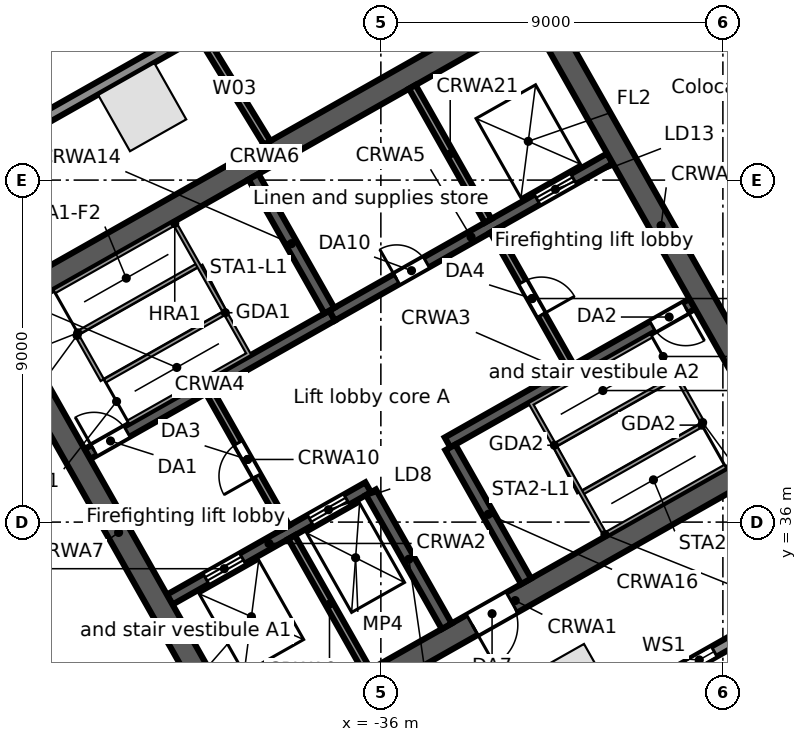
"""IFC4 building model, lengths in metres.
Left out: names, types, materials, properties, quantities, classifications, styles, units other than length and angle.
Written with IfcOpenShell. Run it as: python <this file> out.ifc"""

import sys

from ifc_helpers import new_model, si_unit, direction, frame, frame_2d, origin, origin_2d, place, context, subcontext, project, spatial, rectangle, extrude, element, fill, save


model = new_model("IFC4")
c1 = context("Model", 3, precision=1e-05, world=origin(), true_north=direction((0.0, 1.0)))
c2 = subcontext(c1, "Body", "Model", "MODEL_VIEW")
j1 = project(units=[si_unit("LENGTHUNIT", "METRE"), si_unit("PLANEANGLEUNIT", "RADIAN")], contexts=[c1])
p1 = place(None, origin())
s1 = spatial("IfcSite", under=j1, at=p1, CompositionType="ELEMENT")
p2 = place(p1, origin())
s2 = spatial("IfcBuilding", under=s1, at=p2, CompositionType="ELEMENT")
p3 = place(p2, frame((0.0, 0.0, 26.5)))
s3 = spatial("IfcBuildingStorey", under=s2, at=p3, CompositionType="ELEMENT", Elevation=26.5)
for number, where, z_axis, x_axis in (
    (1, (-42.28, 46.919, 0.0), (0.0, 0.0, 1.0), (-0.87, -0.492, 0.0)),
    (2, (-30.976, 31.635, 0.0), (0.0, 0.0, 1.0), (0.87, 0.492, 0.0)),
):
    element("IfcColumn", number, at=place(p3, frame(where, z_axis=z_axis, x_axis=x_axis)), inside=s3, PredefinedType="COLUMN", context=c2, shape_type="SweptSolid", body=[
        extrude(rectangle(XDim=1.7, YDim=1.7, at=origin_2d()), origin(), (0.0, 0.0, 1.0), 5.0),
    ])
p4 = place(p3, frame((-58.745, 38.764, 0.0), z_axis=(0.0, 0.0, 1.0), x_axis=(0.870355811726, 0.492423355453, 0.0)))
e3 = element("IfcWall", 3, at=p4, inside=s3, PredefinedType="STANDARD", context=c2, shape_type="SweptSolid", body=[
    extrude(rectangle(XDim=64.025, YDim=0.3, at=frame_2d((32.013, 0.0))), origin(), (0.0, 0.0, 1.0), 4.68),
])
p5 = place(p4, frame((60.122, 0.0, 0.6)))
e4 = element("IfcOpeningElement", 4, at=p5, cuts=e3, PredefinedType="OPENING", context=c2, shape_type="SweptSolid", body=[
    extrude(rectangle(XDim=0.9, YDim=3.2, at=frame_2d((0.45, 1.6))), frame((0.0, 0.16, 0.0), z_axis=(0.0, -1.0, 0.0), x_axis=(1.0, 0.0, 0.0)), (0.0, 0.0, 1.0), 0.32),
])
p6 = place(p4, frame((50.992, 0.0, 0.6)))
e5 = element("IfcOpeningElement", 5, at=p6, cuts=e3, PredefinedType="OPENING", context=c2, shape_type="SweptSolid", body=[
    extrude(rectangle(XDim=0.9, YDim=3.2, at=frame_2d((0.45, 1.6))), frame((0.0, 0.16, 0.0), z_axis=(0.0, -1.0, 0.0), x_axis=(1.0, 0.0, 0.0)), (0.0, 0.0, 1.0), 0.32),
])
p7 = place(p4, frame((41.862, 0.0, 0.6)))
e6 = element("IfcOpeningElement", 6, at=p7, cuts=e3, PredefinedType="OPENING", context=c2, shape_type="SweptSolid", body=[
    extrude(rectangle(XDim=0.9, YDim=3.2, at=frame_2d((0.45, 1.6))), frame((0.0, 0.16, 0.0), z_axis=(0.0, -1.0, 0.0), x_axis=(1.0, 0.0, 0.0)), (0.0, 0.0, 1.0), 0.32),
])
p8 = place(p4, frame((39.129, 0.0, 0.0)))
e7 = element("IfcOpeningElement", 7, at=p8, cuts=e3, PredefinedType="OPENING", context=c2, shape_type="SweptSolid", body=[
    extrude(rectangle(XDim=1.8, YDim=2.4, at=frame_2d((0.9, 1.2))), frame((0.0, 0.16, 0.0), z_axis=(0.0, -1.0, 0.0), x_axis=(1.0, 0.0, 0.0)), (0.0, 0.0, 1.0), 0.32),
])
p9 = place(p4, frame((32.732, 0.0, 0.6)))
e8 = element("IfcOpeningElement", 8, at=p9, cuts=e3, PredefinedType="OPENING", context=c2, shape_type="SweptSolid", body=[
    extrude(rectangle(XDim=0.9, YDim=3.2, at=frame_2d((0.45, 1.6))), frame((0.0, 0.16, 0.0), z_axis=(0.0, -1.0, 0.0), x_axis=(1.0, 0.0, 0.0)), (0.0, 0.0, 1.0), 0.32),
])
p10 = place(p4, frame((23.602, 0.0, 0.6)))
e9 = element("IfcOpeningElement", 9, at=p10, cuts=e3, PredefinedType="OPENING", context=c2, shape_type="SweptSolid", body=[
    extrude(rectangle(XDim=0.9, YDim=3.2, at=frame_2d((0.45, 1.6))), frame((0.0, 0.16, 0.0), z_axis=(0.0, -1.0, 0.0), x_axis=(1.0, 0.0, 0.0)), (0.0, 0.0, 1.0), 0.32),
])
p11 = place(p4, frame((20.87, 0.0, 0.0)))
e10 = element("IfcOpeningElement", 10, at=p11, cuts=e3, PredefinedType="OPENING", context=c2, shape_type="SweptSolid", body=[
    extrude(rectangle(XDim=1.8, YDim=2.4, at=frame_2d((0.9, 1.2))), frame((0.0, 0.16, 0.0), z_axis=(0.0, -1.0, 0.0), x_axis=(1.0, 0.0, 0.0)), (0.0, 0.0, 1.0), 0.32),
])
p12 = place(p4, frame((14.472, 0.0, 0.6)))
e11 = element("IfcOpeningElement", 11, at=p12, cuts=e3, PredefinedType="OPENING", context=c2, shape_type="SweptSolid", body=[
    extrude(rectangle(XDim=0.9, YDim=3.2, at=frame_2d((0.45, 1.6))), frame((0.0, 0.16, 0.0), z_axis=(0.0, -1.0, 0.0), x_axis=(1.0, 0.0, 0.0)), (0.0, 0.0, 1.0), 0.32),
])
p13 = place(p4, frame((5.342, 0.0, 0.6)))
e12 = element("IfcOpeningElement", 12, at=p13, cuts=e3, PredefinedType="OPENING", context=c2, shape_type="SweptSolid", body=[
    extrude(rectangle(XDim=0.9, YDim=3.2, at=frame_2d((0.45, 1.6))), frame((0.0, 0.16, 0.0), z_axis=(0.0, -1.0, 0.0), x_axis=(1.0, 0.0, 0.0)), (0.0, 0.0, 1.0), 0.32),
])
p14 = place(p3, frame((-44.109, 26.504, 0.0), z_axis=(0.0, 0.0, 1.0), x_axis=(-0.857169502585, 0.515034410344, 0.0)))
e13 = element("IfcWall", 13, at=p14, inside=s3, PredefinedType="STANDARD", context=c2, shape_type="SweptSolid", body=[
    extrude(rectangle(XDim=17.127, YDim=0.3, at=frame_2d((8.563, 0.0))), origin(), (0.0, 0.0, 1.0), 4.68),
])
p15 = place(p14, frame((13.403, 0.0, 0.6)))
e14 = element("IfcOpeningElement", 14, at=p15, cuts=e13, PredefinedType="OPENING", context=c2, shape_type="SweptSolid", body=[
    extrude(rectangle(XDim=0.9, YDim=3.2, at=frame_2d((0.45, 1.6))), frame((0.0, 0.16, 0.0), z_axis=(0.0, -1.0, 0.0), x_axis=(1.0, 0.0, 0.0)), (0.0, 0.0, 1.0), 0.32),
])
p16 = place(p14, frame((10.828, 0.0, 0.0)))
e15 = element("IfcOpeningElement", 15, at=p16, cuts=e13, PredefinedType="OPENING", context=c2, shape_type="SweptSolid", body=[
    extrude(rectangle(XDim=1.8, YDim=2.4, at=frame_2d((0.9, 1.2))), frame((0.0, 0.16, 0.0), z_axis=(0.0, -1.0, 0.0), x_axis=(1.0, 0.0, 0.0)), (0.0, 0.0, 1.0), 0.32),
])
p17 = place(p14, frame((4.903, 0.0, 0.6)))
e16 = element("IfcOpeningElement", 16, at=p17, cuts=e13, PredefinedType="OPENING", context=c2, shape_type="SweptSolid", body=[
    extrude(rectangle(XDim=0.9, YDim=3.2, at=frame_2d((0.45, 1.6))), frame((0.0, 0.16, 0.0), z_axis=(0.0, -1.0, 0.0), x_axis=(1.0, 0.0, 0.0)), (0.0, 0.0, 1.0), 0.32),
])
p18 = place(p14, frame((2.328, 0.0, 0.0)))
e17 = element("IfcOpeningElement", 17, at=p18, cuts=e13, PredefinedType="OPENING", context=c2, shape_type="SweptSolid", body=[
    extrude(rectangle(XDim=1.8, YDim=2.4, at=frame_2d((0.9, 1.2))), frame((0.0, 0.16, 0.0), z_axis=(0.0, -1.0, 0.0), x_axis=(1.0, 0.0, 0.0)), (0.0, 0.0, 1.0), 0.32),
])
p19 = place(p3, frame((-0.055, 47.969, 0.0), z_axis=(0.0, 0.0, 1.0), x_axis=(-0.870355730478, -0.492423499058, 0.0)))
e18 = element("IfcWall", 18, at=p19, inside=s3, PredefinedType="STANDARD", context=c2, shape_type="SweptSolid", body=[
    extrude(rectangle(XDim=43.75, YDim=0.3, at=frame_2d((21.875, 0.0))), origin(), (0.0, 0.0, 1.0), 4.68),
])
p20 = place(p19, frame((39.977, 0.0, 0.6)))
e19 = element("IfcOpeningElement", 19, at=p20, cuts=e18, PredefinedType="OPENING", context=c2, shape_type="SweptSolid", body=[
    extrude(rectangle(XDim=0.9, YDim=3.2, at=frame_2d((0.45, 1.6))), frame((0.0, 0.16, 0.0), z_axis=(0.0, -1.0, 0.0), x_axis=(1.0, 0.0, 0.0)), (0.0, 0.0, 1.0), 0.32),
])
p21 = place(p19, frame((31.222, 0.0, 0.6)))
e20 = element("IfcOpeningElement", 20, at=p21, cuts=e18, PredefinedType="OPENING", context=c2, shape_type="SweptSolid", body=[
    extrude(rectangle(XDim=0.9, YDim=3.2, at=frame_2d((0.45, 1.6))), frame((0.0, 0.16, 0.0), z_axis=(0.0, -1.0, 0.0), x_axis=(1.0, 0.0, 0.0)), (0.0, 0.0, 1.0), 0.32),
])
p22 = place(p19, frame((28.584, 0.0, 0.0)))
e21 = element("IfcOpeningElement", 21, at=p22, cuts=e18, PredefinedType="OPENING", context=c2, shape_type="SweptSolid", body=[
    extrude(rectangle(XDim=1.8, YDim=2.4, at=frame_2d((0.9, 1.2))), frame((0.0, 0.16, 0.0), z_axis=(0.0, -1.0, 0.0), x_axis=(1.0, 0.0, 0.0)), (0.0, 0.0, 1.0), 0.32),
])
p23 = place(p19, frame((22.468, 0.0, 0.6)))
e22 = element("IfcOpeningElement", 22, at=p23, cuts=e18, PredefinedType="OPENING", context=c2, shape_type="SweptSolid", body=[
    extrude(rectangle(XDim=0.9, YDim=3.2, at=frame_2d((0.45, 1.6))), frame((0.0, 0.16, 0.0), z_axis=(0.0, -1.0, 0.0), x_axis=(1.0, 0.0, 0.0)), (0.0, 0.0, 1.0), 0.32),
])
p24 = place(p19, frame((13.713, 0.0, 0.6)))
e23 = element("IfcOpeningElement", 23, at=p24, cuts=e18, PredefinedType="OPENING", context=c2, shape_type="SweptSolid", body=[
    extrude(rectangle(XDim=0.9, YDim=3.2, at=frame_2d((0.45, 1.6))), frame((0.0, 0.16, 0.0), z_axis=(0.0, -1.0, 0.0), x_axis=(1.0, 0.0, 0.0)), (0.0, 0.0, 1.0), 0.32),
])
p25 = place(p19, frame((11.075, 0.0, 0.0)))
e24 = element("IfcOpeningElement", 24, at=p25, cuts=e18, PredefinedType="OPENING", context=c2, shape_type="SweptSolid", body=[
    extrude(rectangle(XDim=1.8, YDim=2.4, at=frame_2d((0.9, 1.2))), frame((0.0, 0.16, 0.0), z_axis=(0.0, -1.0, 0.0), x_axis=(1.0, 0.0, 0.0)), (0.0, 0.0, 1.0), 0.32),
])
p26 = place(p19, frame((4.959, 0.0, 0.6)))
e25 = element("IfcOpeningElement", 25, at=p26, cuts=e18, PredefinedType="OPENING", context=c2, shape_type="SweptSolid", body=[
    extrude(rectangle(XDim=0.9, YDim=3.2, at=frame_2d((0.45, 1.6))), frame((0.0, 0.16, 0.0), z_axis=(0.0, -1.0, 0.0), x_axis=(1.0, 0.0, 0.0)), (0.0, 0.0, 1.0), 0.32),
])
p27 = place(p3, frame((-39.862, 29.749, 0.0), z_axis=(0.0, 0.0, 1.0), x_axis=(0.870350116061, 0.492433422375, 0.0)))
e26 = element("IfcWall", 26, at=p27, inside=s3, PredefinedType="SOLIDWALL", context=c2, shape_type="SweptSolid", body=[
    extrude(rectangle(XDim=17.0, YDim=0.6, at=frame_2d((8.5, 0.0))), origin(), (0.0, 0.0, 1.0), 4.68),
])
p28 = place(p27, frame((7.2, 0.0, 0.0)))
e27 = element("IfcOpeningElement", 27, at=p28, cuts=e26, PredefinedType="OPENING", context=c2, shape_type="SweptSolid", body=[
    extrude(rectangle(XDim=1.2, YDim=2.1, at=frame_2d((0.6, 1.05))), frame((0.0, 0.31, 0.0), z_axis=(0.0, -1.0, 0.0), x_axis=(1.0, 0.0, 0.0)), (0.0, 0.0, 1.0), 0.62),
])
p29 = place(p3, frame((-41.556, 33.961, 0.0), z_axis=(0.0, 0.0, 1.0), x_axis=(0.870343731308, 0.492444706919, 0.0)))
e28 = element("IfcWall", 28, at=p29, inside=s3, PredefinedType="SOLIDWALL", context=c2, shape_type="SweptSolid", body=[
    extrude(rectangle(XDim=6.0, YDim=0.3, at=frame_2d((3.0, 0.0))), origin(), (0.0, 0.0, 1.0), 4.68),
])
p30 = place(p29, frame((1.1, 0.0, 0.0)))
e29 = element("IfcOpeningElement", 29, at=p30, cuts=e28, PredefinedType="OPENING", context=c2, shape_type="SweptSolid", body=[
    extrude(rectangle(XDim=1.1, YDim=2.1, at=frame_2d((0.55, 1.05))), frame((0.0, 0.16, 0.0), z_axis=(0.0, -1.0, 0.0), x_axis=(1.0, 0.0, 0.0)), (0.0, 0.0, 1.0), 0.32),
])
p31 = place(p29, frame((4.25, 0.0, 0.0)))
e30 = element("IfcOpeningElement", 30, at=p31, cuts=e28, PredefinedType="OPENING", context=c2, shape_type="SweptSolid", body=[
    extrude(rectangle(XDim=1.1, YDim=2.1, at=frame_2d((0.55, 1.05))), frame((0.0, 0.16, 0.0), z_axis=(0.0, -1.0, 0.0), x_axis=(1.0, 0.0, 0.0)), (0.0, 0.0, 1.0), 0.32),
])
p32 = place(p3, frame((-34.245, 38.097, 0.0), z_axis=(0.0, 0.0, 1.0), x_axis=(0.870364910201, 0.492407273597, 0.0)))
e31 = element("IfcWall", 31, at=p32, inside=s3, PredefinedType="SOLIDWALL", context=c2, shape_type="SweptSolid", body=[
    extrude(rectangle(XDim=7.4, YDim=0.3, at=frame_2d((3.7, 0.0))), origin(), (0.0, 0.0, 1.0), 4.68),
])
p33 = place(p32, frame((6.2, 0.0, 0.0)))
e32 = element("IfcOpeningElement", 32, at=p33, cuts=e31, PredefinedType="OPENING", context=c2, shape_type="SweptSolid", body=[
    extrude(rectangle(XDim=1.0, YDim=2.1, at=frame_2d((0.5, 1.05))), frame((0.0, 0.16, 0.0), z_axis=(0.0, -1.0, 0.0), x_axis=(1.0, 0.0, 0.0)), (0.0, 0.0, 1.0), 0.32),
])
p34 = place(p3, frame((-43.723, 37.791, 0.0), z_axis=(0.0, 0.0, 1.0), x_axis=(0.87035077051, 0.49243226567, 0.0)))
e33 = element("IfcWall", 33, at=p34, inside=s3, PredefinedType="SOLIDWALL", context=c2, shape_type="SweptSolid", body=[
    extrude(rectangle(XDim=7.4, YDim=0.3, at=frame_2d((3.7, 0.0))), origin(), (0.0, 0.0, 1.0), 4.68),
])
p35 = place(p34, frame((0.2, 0.0, 0.0)))
e34 = element("IfcOpeningElement", 34, at=p35, cuts=e33, PredefinedType="OPENING", context=c2, shape_type="SweptSolid", body=[
    extrude(rectangle(XDim=1.0, YDim=2.1, at=frame_2d((0.5, 1.05))), frame((0.0, 0.16, 0.0), z_axis=(0.0, -1.0, 0.0), x_axis=(1.0, 0.0, 0.0)), (0.0, 0.0, 1.0), 0.32),
])
p36 = place(p3, frame((-37.282, 41.435, 0.0), z_axis=(0.0, 0.0, 1.0), x_axis=(0.870356516133, 0.492422110414, 0.0)))
e35 = element("IfcWall", 35, at=p36, inside=s3, PredefinedType="SOLIDWALL", context=c2, shape_type="SweptSolid", body=[
    extrude(rectangle(XDim=8.4, YDim=0.3, at=frame_2d((4.2, 0.0))), origin(), (0.0, 0.0, 1.0), 4.68),
])
p37 = place(p36, frame((6.2, 0.0, 0.0)))
e36 = element("IfcOpeningElement", 36, at=p37, cuts=e35, PredefinedType="OPENING", context=c2, shape_type="SweptSolid", body=[
    extrude(rectangle(XDim=1.1, YDim=2.1, at=frame_2d((0.55, 1.05))), frame((0.0, 0.16, 0.0), z_axis=(0.0, -1.0, 0.0), x_axis=(1.0, 0.0, 0.0)), (0.0, 0.0, 1.0), 0.32),
])
p38 = place(p36, frame((1.95, 0.0, 0.0)))
e37 = element("IfcOpeningElement", 37, at=p38, cuts=e35, PredefinedType="OPENING", context=c2, shape_type="SweptSolid", body=[
    extrude(rectangle(XDim=0.9, YDim=2.1, at=frame_2d((0.45, 1.05))), frame((0.0, 0.16, 0.0), z_axis=(0.0, -1.0, 0.0), x_axis=(1.0, 0.0, 0.0)), (0.0, 0.0, 1.0), 0.32),
])
p39 = place(p3, frame((-46.461, 41.412, 0.0), z_axis=(0.0, 0.0, 1.0), x_axis=(0.870350116061, 0.492433422375, 0.0)))
e38 = element("IfcWall", 38, at=p39, inside=s3, PredefinedType="SOLIDWALL", context=c2, shape_type="SweptSolid", body=[
    extrude(rectangle(XDim=17.0, YDim=0.6, at=frame_2d((8.5, 0.0))), origin(), (0.0, 0.0, 1.0), 4.68),
])
p40 = place(p3, frame((-46.052, 41.298, 0.0), z_axis=(0.0, 0.0, 1.0), x_axis=(0.492418598281, -0.870358503186, 0.0)))
e39 = element("IfcWall", 39, at=p40, inside=s3, PredefinedType="SOLIDWALL", context=c2, shape_type="SweptSolid", body=[
    extrude(rectangle(XDim=12.8, YDim=0.6, at=frame_2d((6.4, 0.0))), origin(), (0.0, 0.0, 1.0), 4.68),
])
p41 = place(p3, frame((-38.349, 35.603, 0.0), z_axis=(0.0, 0.0, 1.0), x_axis=(0.49241474071, -0.870360685654, 0.0)))
e40 = element("IfcWall", 40, at=p41, inside=s3, PredefinedType="SOLIDWALL", context=c2, shape_type="SweptSolid", body=[
    extrude(rectangle(XDim=4.05, YDim=0.2, at=frame_2d((2.025, 0.0))), origin(), (0.0, 0.0, 1.0), 4.68),
])
p42 = place(p3, frame((-40.516, 39.433, 0.0), z_axis=(0.0, 0.0, 1.0), x_axis=(0.492453559952, -0.87033872216, 0.0)))
e41 = element("IfcWall", 41, at=p42, inside=s3, PredefinedType="PARTITIONING", context=c2, shape_type="SweptSolid", body=[
    extrude(rectangle(XDim=4.1, YDim=0.2, at=frame_2d((2.05, 0.0))), origin(), (0.0, 0.0, 1.0), 4.68),
])
p43 = place(p42, frame((1.55, 0.0, 0.0)))
e42 = element("IfcOpeningElement", 42, at=p43, cuts=e41, PredefinedType="OPENING", context=c2, shape_type="SweptSolid", body=[
    extrude(rectangle(XDim=1.0, YDim=2.1, at=frame_2d((0.5, 1.05))), frame((0.0, 0.11, 0.0), z_axis=(0.0, -1.0, 0.0), x_axis=(1.0, 0.0, 0.0)), (0.0, 0.0, 1.0), 0.22),
])
p44 = place(p3, frame((-36.26, 36.785, 0.0), z_axis=(0.0, 0.0, 1.0), x_axis=(0.492440575896, -0.870346068648, 0.0)))
e43 = element("IfcWall", 43, at=p44, inside=s3, PredefinedType="SOLIDWALL", context=c2, shape_type="SweptSolid", body=[
    extrude(rectangle(XDim=4.05, YDim=0.3, at=frame_2d((2.025, 0.0))), origin(), (0.0, 0.0, 1.0), 4.68),
])
p45 = place(p3, frame((-39.35, 45.09, 0.0), z_axis=(0.0, 0.0, 1.0), x_axis=(0.49241474071, -0.870360685654, 0.0)))
e44 = element("IfcWall", 44, at=p45, inside=s3, PredefinedType="SOLIDWALL", context=c2, shape_type="SweptSolid", body=[
    extrude(rectangle(XDim=4.05, YDim=0.3, at=frame_2d((2.025, 0.0))), origin(), (0.0, 0.0, 1.0), 4.68),
])
p46 = place(p3, frame((-34.171, 37.967, 0.0), z_axis=(0.0, 0.0, 1.0), x_axis=(0.492394910396, -0.870371904542, 0.0)))
e45 = element("IfcWall", 45, at=p46, inside=s3, PredefinedType="SOLIDWALL", context=c2, shape_type="SweptSolid", body=[
    extrude(rectangle(XDim=4.05, YDim=0.3, at=frame_2d((2.025, 0.0))), origin(), (0.0, 0.0, 1.0), 4.68),
])
p47 = place(p3, frame((-33.031, 43.667, 0.0), z_axis=(0.0, 0.0, 1.0), x_axis=(0.492408451753, -0.87036424366, 0.0)))
e46 = element("IfcWall", 46, at=p47, inside=s3, PredefinedType="PARTITIONING", context=c2, shape_type="SweptSolid", body=[
    extrude(rectangle(XDim=4.1, YDim=0.2, at=frame_2d((2.05, 0.0))), origin(), (0.0, 0.0, 1.0), 4.68),
])
p48 = place(p47, frame((1.55, 0.0, 0.0)))
e47 = element("IfcOpeningElement", 47, at=p48, cuts=e46, PredefinedType="OPENING", context=c2, shape_type="SweptSolid", body=[
    extrude(rectangle(XDim=1.0, YDim=2.1, at=frame_2d((0.5, 1.05))), frame((0.0, 0.11, 0.0), z_axis=(0.0, -1.0, 0.0), x_axis=(1.0, 0.0, 0.0)), (0.0, 0.0, 1.0), 0.22),
])
p49 = place(p3, frame((-35.173, 47.454, 0.0), z_axis=(0.0, 0.0, 1.0), x_axis=(0.492440575896, -0.870346068648, 0.0)))
e48 = element("IfcWall", 48, at=p49, inside=s3, PredefinedType="SOLIDWALL", context=c2, shape_type="SweptSolid", body=[
    extrude(rectangle(XDim=4.05, YDim=0.2, at=frame_2d((2.025, 0.0))), origin(), (0.0, 0.0, 1.0), 4.68),
])
p50 = place(p3, frame((-31.778, 49.374, 0.0), z_axis=(0.0, 0.0, 1.0), x_axis=(0.492433046652, -0.870350328641, 0.0)))
e49 = element("IfcWall", 49, at=p50, inside=s3, PredefinedType="SOLIDWALL", context=c2, shape_type="SweptSolid", body=[
    extrude(rectangle(XDim=12.8, YDim=0.6, at=frame_2d((6.4, 0.0))), origin(), (0.0, 0.0, 1.0), 4.68),
])
p51 = place(p3, frame((-40.713, 48.794, 0.0), z_axis=(0.0, 0.0, 1.0), x_axis=(0.52165366254, -0.853157345604, 0.0)))
e50 = element("IfcWall", 50, at=p51, inside=s3, PredefinedType="PARTITIONING", context=c2, shape_type="SweptSolid", body=[
    extrude(rectangle(XDim=3.297, YDim=0.2, at=frame_2d((1.648, 0.0))), origin(), (0.0, 0.0, 1.0), 3.96),
])
p52 = place(p21, origin())
e51 = element("IfcWindow", 51, at=p52, inside=s3, PartitioningType="SINGLE_PANEL", PredefinedType="WINDOW", context=c2, shape_type="SweptSolid", body=[
    extrude(rectangle(XDim=0.9, YDim=3.2, at=frame_2d((0.45, 1.6))), frame((0.0, 0.03, 0.0), z_axis=(0.0, -1.0, 0.0), x_axis=(1.0, 0.0, 0.0)), (0.0, 0.0, 1.0), 0.06),
])
fill(e20, e51)
p53 = place(p37, origin())
e52 = element("IfcDoor", 52, at=p53, inside=s3, OperationType="DOUBLE_DOOR_SLIDING", PredefinedType="DOOR", context=c2, shape_type="SweptSolid", body=[
    extrude(rectangle(XDim=1.1, YDim=2.1, at=frame_2d((0.55, 1.05))), frame((0.0, 0.025, 0.0), z_axis=(0.0, -1.0, 0.0), x_axis=(1.0, 0.0, 0.0)), (0.0, 0.0, 1.0), 0.05),
])
fill(e36, e52)
p54 = place(p30, origin())
e53 = element("IfcDoor", 53, at=p54, inside=s3, OperationType="DOUBLE_DOOR_SLIDING", PredefinedType="DOOR", context=c2, shape_type="SweptSolid", body=[
    extrude(rectangle(XDim=1.1, YDim=2.1, at=frame_2d((0.55, 1.05))), frame((0.0, 0.025, 0.0), z_axis=(0.0, -1.0, 0.0), x_axis=(1.0, 0.0, 0.0)), (0.0, 0.0, 1.0), 0.05),
])
fill(e29, e53)
p55 = place(p31, origin())
e54 = element("IfcDoor", 54, at=p55, inside=s3, OperationType="DOUBLE_DOOR_SLIDING", PredefinedType="DOOR", context=c2, shape_type="SweptSolid", body=[
    extrude(rectangle(XDim=1.1, YDim=2.1, at=frame_2d((0.55, 1.05))), frame((0.0, 0.025, 0.0), z_axis=(0.0, -1.0, 0.0), x_axis=(1.0, 0.0, 0.0)), (0.0, 0.0, 1.0), 0.05),
])
fill(e30, e54)
p56 = place(p35, origin())
e55 = element("IfcDoor", 55, at=p56, inside=s3, OperationType="SINGLE_SWING_LEFT", PredefinedType="DOOR", context=c2, shape_type="SweptSolid", body=[
    extrude(rectangle(XDim=1.0, YDim=2.1, at=frame_2d((0.5, 1.05))), frame((0.0, 0.025, 0.0), z_axis=(0.0, -1.0, 0.0), x_axis=(1.0, 0.0, 0.0)), (0.0, 0.0, 1.0), 0.05),
])
fill(e34, e55)
p57 = place(p33, frame((1.0, 0.0, 0.0), z_axis=(0.0, 0.0, 1.0), x_axis=(-1.0, 0.0, 0.0)))
e56 = element("IfcDoor", 56, at=p57, inside=s3, OperationType="SINGLE_SWING_LEFT", PredefinedType="DOOR", context=c2, shape_type="SweptSolid", body=[
    extrude(rectangle(XDim=1.0, YDim=2.1, at=frame_2d((0.5, 1.05))), frame((0.0, 0.025, 0.0), z_axis=(0.0, -1.0, 0.0), x_axis=(1.0, 0.0, 0.0)), (0.0, 0.0, 1.0), 0.05),
])
fill(e32, e56)
p58 = place(p43, frame((1.0, 0.0, 0.0), z_axis=(0.0, 0.0, 1.0), x_axis=(-1.0, 0.0, 0.0)))
e57 = element("IfcDoor", 57, at=p58, inside=s3, OperationType="SINGLE_SWING_LEFT", PredefinedType="DOOR", context=c2, shape_type="SweptSolid", body=[
    extrude(rectangle(XDim=1.0, YDim=2.1, at=frame_2d((0.5, 1.05))), frame((0.0, 0.025, 0.0), z_axis=(0.0, -1.0, 0.0), x_axis=(1.0, 0.0, 0.0)), (0.0, 0.0, 1.0), 0.05),
])
fill(e42, e57)
p59 = place(p48, origin())
e58 = element("IfcDoor", 58, at=p59, inside=s3, OperationType="SINGLE_SWING_RIGHT", PredefinedType="DOOR", context=c2, shape_type="SweptSolid", body=[
    extrude(rectangle(XDim=1.0, YDim=2.1, at=frame_2d((0.5, 1.05))), frame((0.0, 0.025, 0.0), z_axis=(0.0, -1.0, 0.0), x_axis=(1.0, 0.0, 0.0)), (0.0, 0.0, 1.0), 0.05),
])
fill(e47, e58)
p60 = place(p28, frame((1.2, 0.0, 0.0), z_axis=(0.0, 0.0, 1.0), x_axis=(-1.0, 0.0, 0.0)))
e59 = element("IfcDoor", 59, at=p60, inside=s3, OperationType="SINGLE_SWING_RIGHT", PredefinedType="DOOR", context=c2, shape_type="SweptSolid", body=[
    extrude(rectangle(XDim=1.2, YDim=2.1, at=frame_2d((0.6, 1.05))), frame((0.0, 0.025, 0.0), z_axis=(0.0, -1.0, 0.0), x_axis=(1.0, 0.0, 0.0)), (0.0, 0.0, 1.0), 0.05),
])
fill(e27, e59)
p61 = place(p38, origin())
e60 = element("IfcDoor", 60, at=p61, inside=s3, OperationType="SINGLE_SWING_LEFT", PredefinedType="DOOR", context=c2, shape_type="SweptSolid", body=[
    extrude(rectangle(XDim=0.9, YDim=2.1, at=frame_2d((0.45, 1.05))), frame((0.0, 0.025, 0.0), z_axis=(0.0, -1.0, 0.0), x_axis=(1.0, 0.0, 0.0)), (0.0, 0.0, 1.0), 0.05),
])
fill(e37, e60)
save(model, sys.argv[1])
